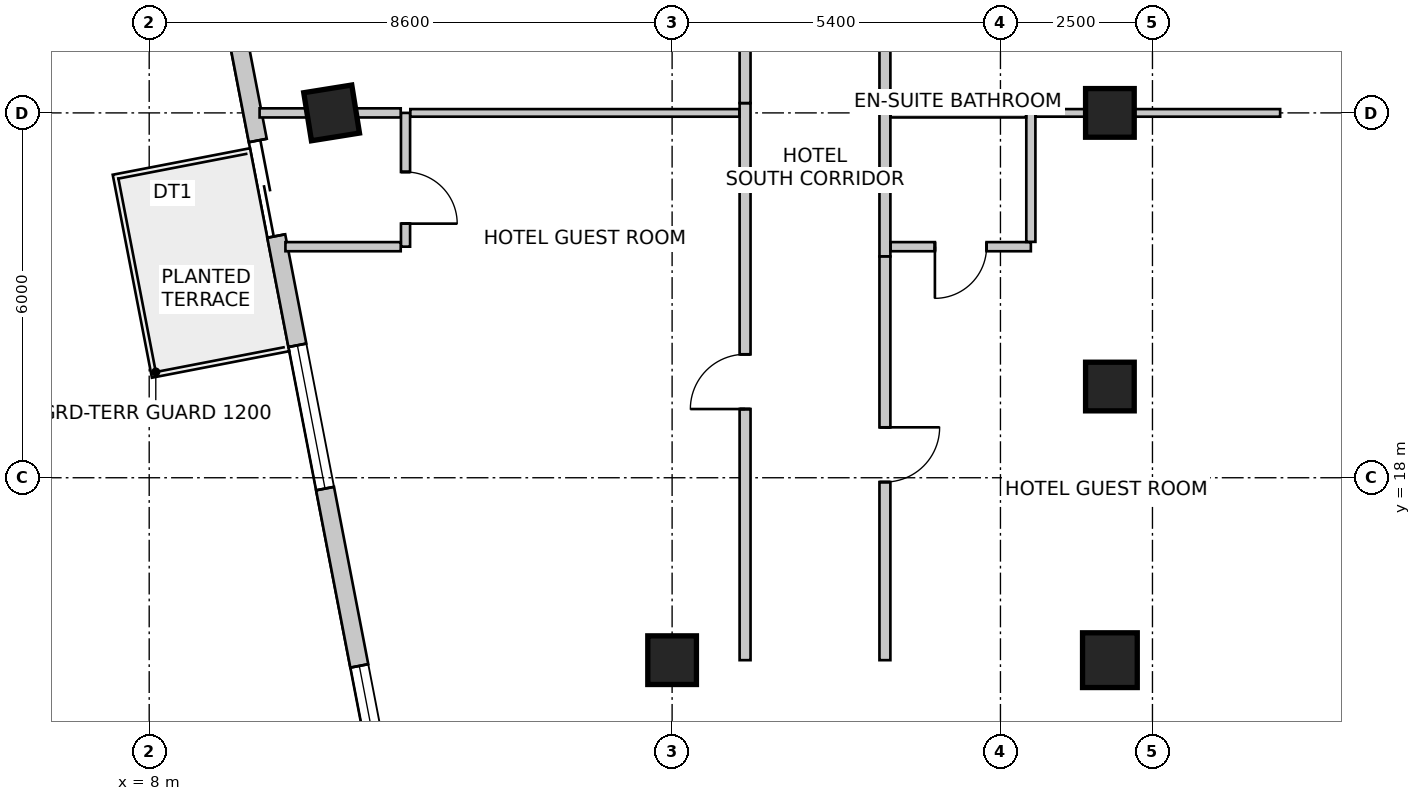
"""IFC4 building model, lengths in metres.
Left out: names, types, materials, properties, quantities, classifications, styles, units other than length and angle.
Written with IfcOpenShell. Run it as: python <this file> out.ifc"""

import sys

from ifc_helpers import new_model, si_unit, direction, frame, frame_2d, origin, origin_2d, place, context, subcontext, project, spatial, rectangle, extrude, source, transform, mapped, element, fill, save


model = new_model("IFC4")
c1 = context("Model", 3, precision=1e-05, world=origin(), true_north=direction((0.0, 1.0)))
c2 = subcontext(c1, "Body", "Model", "MODEL_VIEW")
j1 = project(units=[si_unit("LENGTHUNIT", "METRE"), si_unit("PLANEANGLEUNIT", "RADIAN")], contexts=[c1])
p1 = place(None, origin())
s1 = spatial("IfcSite", under=j1, at=p1, CompositionType="ELEMENT")
p2 = place(p1, origin())
s2 = spatial("IfcBuilding", under=s1, at=p2, CompositionType="ELEMENT")
p3 = place(p2, frame((0.0, 0.0, 114.2)))
s3 = spatial("IfcBuildingStorey", under=s2, at=p3, CompositionType="ELEMENT", Elevation=114.2)
m1 = source(origin(), c2, "Body", "SweptSolid", [
    extrude(rectangle(XDim=0.8, YDim=0.8, at=origin_2d()), origin(), (0.0, 0.0, 1.0), 3.6),
])
for number, where, z_axis, x_axis in (
    (1, (11.0, 24.0, 0.0), (0.0, 0.0, 1.0), (0.158, -0.987, 0.0)),
    (2, (23.8, 24.0, 0.0), (0.0, 0.0, 1.0), (1.0, 0.0, 0.0)),
    (3, (23.8, 19.5, 0.0), (0.0, 0.0, 1.0), (1.0, 0.0, 0.0)),
):
    element("IfcColumn", number, at=place(p3, frame(where, z_axis=z_axis, x_axis=x_axis)), inside=s3, PredefinedType="COLUMN", context=c2, shape_type="MappedRepresentation", body=[
        mapped(m1, transform((0.0, 0.0, 0.0), scale=1.0)),
    ])
m2 = source(origin(), c2, "Body", "SweptSolid", [
    extrude(rectangle(XDim=0.9, YDim=0.9, at=origin_2d()), origin(), (0.0, 0.0, 1.0), 3.6),
])
p4 = place(p3, frame((23.8, 15.0, 0.0), z_axis=(0.0, 0.0, 1.0), x_axis=(1.0, 0.0, 0.0)))
e4 = element("IfcColumn", 4, at=p4, inside=s3, PredefinedType="COLUMN", context=c2, shape_type="MappedRepresentation", body=[
    mapped(m2, transform((0.0, 0.0, 0.0), scale=1.0)),
])
p5 = place(p3, frame((16.6, 15.0, 0.0), z_axis=(0.0, 0.0, 1.0), x_axis=(1.0, 0.0, 0.0)))
e5 = element("IfcColumn", 5, at=p5, inside=s3, PredefinedType="COLUMN", context=c2, shape_type="MappedRepresentation", body=[
    mapped(m1, transform((0.0, 0.0, 0.0), scale=1.0)),
])
p6 = place(p3, frame((8.185, 31.834, 0.0), z_axis=(0.0, 0.0, 1.0), x_axis=(0.189707113148, -0.981840725994, 0.0)))
e6 = element("IfcWall", 6, at=p6, inside=s3, PredefinedType="SOLIDWALL", context=c2, shape_type="SweptSolid", body=[
    extrude(rectangle(XDim=21.221, YDim=0.3, at=frame_2d((10.611, 0.0))), origin(), (0.0, 0.0, 1.0), 3.35),
])
m3 = source(origin(), c2, "Body", "SweptSolid", [
    extrude(rectangle(XDim=1.6, YDim=2.15, at=frame_2d((0.8, 1.075))), frame((0.0, 0.16, 0.0), z_axis=(0.0, -1.0, 0.0), x_axis=(1.0, 0.0, 0.0)), (0.0, 0.0, 1.0), 0.32),
])
p7 = place(p6, frame((8.441, 0.0, 0.0)))
e7 = element("IfcOpeningElement", 7, at=p7, cuts=e6, PredefinedType="OPENING", context=c2, shape_type="MappedRepresentation", body=[
    mapped(m3, transform((0.0, 0.0, 0.0), scale=1.0)),
])
m4 = source(origin(), c2, "Body", "SweptSolid", [
    extrude(rectangle(XDim=1.5, YDim=1.8, at=frame_2d((0.75, 0.9))), frame((0.0, 0.16, 0.0), z_axis=(0.0, -1.0, 0.0), x_axis=(1.0, 0.0, 0.0)), (0.0, 0.0, 1.0), 0.32),
])
p8 = place(p6, frame((0.977, 0.0, 0.85)))
e8 = element("IfcOpeningElement", 8, at=p8, cuts=e6, PredefinedType="OPENING", context=c2, shape_type="MappedRepresentation", body=[
    mapped(m4, transform((0.0, 0.0, 0.0), scale=1.0)),
])
m5 = source(origin(), c2, "Body", "SweptSolid", [
    extrude(rectangle(XDim=2.4, YDim=2.2, at=frame_2d((1.2, 1.1))), frame((0.0, 0.16, 0.0), z_axis=(0.0, -1.0, 0.0), x_axis=(1.0, 0.0, 0.0)), (0.0, 0.0, 1.0), 0.32),
])
p9 = place(p6, frame((4.219, 0.0, 0.85)))
e9 = element("IfcOpeningElement", 9, at=p9, cuts=e6, PredefinedType="OPENING", context=c2, shape_type="MappedRepresentation", body=[
    mapped(m5, transform((0.0, 0.0, 0.0), scale=1.0)),
])
p10 = place(p6, frame((11.871, 0.0, 0.85)))
e10 = element("IfcOpeningElement", 10, at=p10, cuts=e6, PredefinedType="OPENING", context=c2, shape_type="MappedRepresentation", body=[
    mapped(m5, transform((0.0, 0.0, 0.0), scale=1.0)),
])
m6 = source(origin(), c2, "Body", "SweptSolid", [
    extrude(rectangle(XDim=2.1, YDim=2.0, at=frame_2d((1.05, 1.0))), frame((0.0, 0.16, 0.0), z_axis=(0.0, -1.0, 0.0), x_axis=(1.0, 0.0, 0.0)), (0.0, 0.0, 1.0), 0.32),
])
p11 = place(p6, frame((17.241, 0.0, 0.85)))
e11 = element("IfcOpeningElement", 11, at=p11, cuts=e6, PredefinedType="OPENING", context=c2, shape_type="MappedRepresentation", body=[
    mapped(m6, transform((0.0, 0.0, 0.0), scale=1.0)),
])
p12 = place(p3, frame((17.8, 15.0, 0.0), z_axis=(0.0, 0.0, 1.0), x_axis=(0.0, 1.0, 0.0)))
e12 = element("IfcWall", 12, at=p12, inside=s3, PredefinedType="PARTITIONING", context=c2, shape_type="SweptSolid", body=[
    extrude(rectangle(XDim=9.16, YDim=0.18, at=frame_2d((4.58, 0.0))), origin(), (0.0, 0.0, 1.0), 2.492),
])
m7 = source(origin(), c2, "Body", "SweptSolid", [
    extrude(rectangle(XDim=0.9, YDim=2.15, at=frame_2d((0.45, 1.075))), frame((0.0, 0.1, 0.0), z_axis=(0.0, -1.0, 0.0), x_axis=(1.0, 0.0, 0.0)), (0.0, 0.0, 1.0), 0.2),
])
p13 = place(p12, frame((4.13, 0.0, 0.0)))
e13 = element("IfcOpeningElement", 13, at=p13, cuts=e12, PredefinedType="OPENING", context=c2, shape_type="MappedRepresentation", body=[
    mapped(m7, transform((0.0, 0.0, 0.0), scale=1.0)),
])
p14 = place(p3, frame((20.1, 24.16, 0.0), z_axis=(0.0, 0.0, 1.0), x_axis=(0.0, -1.0, 0.0)))
e14 = element("IfcWall", 14, at=p14, inside=s3, PredefinedType="PARTITIONING", context=c2, shape_type="SweptSolid", body=[
    extrude(rectangle(XDim=2.52, YDim=0.18, at=frame_2d((1.26, 0.0))), origin(), (0.0, 0.0, 1.0), 2.803),
])
p15 = place(p3, frame((20.1, 21.638, 0.0), z_axis=(0.0, 0.0, 1.0), x_axis=(0.0, -1.0, 0.0)))
e15 = element("IfcWall", 15, at=p15, inside=s3, PredefinedType="PARTITIONING", context=c2, shape_type="SweptSolid", body=[
    extrude(rectangle(XDim=6.638, YDim=0.18, at=frame_2d((3.319, 0.0))), origin(), (0.0, 0.0, 1.0), 2.492),
])
p16 = place(p15, frame((2.809, 0.0, 0.0)))
e16 = element("IfcOpeningElement", 16, at=p16, cuts=e15, PredefinedType="OPENING", context=c2, shape_type="MappedRepresentation", body=[
    mapped(m7, transform((0.0, 0.0, 0.0), scale=1.0)),
])
p17 = place(p3, frame((17.8, 24.162, 0.0), z_axis=(0.0, 0.0, 1.0), x_axis=(0.0, 1.0, 0.0)))
e17 = element("IfcWall", 17, at=p17, inside=s3, PredefinedType="PARTITIONING", context=c2, shape_type="SweptSolid", body=[
    extrude(rectangle(XDim=6.994, YDim=0.18, at=frame_2d((3.497, 0.0))), origin(), (0.0, 0.0, 1.0), 2.788),
])
p18 = place(p17, frame((3.047, 0.0, 0.0)))
e18 = element("IfcOpeningElement", 18, at=p18, cuts=e17, PredefinedType="OPENING", context=c2, shape_type="MappedRepresentation", body=[
    mapped(m7, transform((0.0, 0.0, 0.0), scale=1.0)),
])
p19 = place(p3, frame((20.1, 28.888, 0.0), z_axis=(0.0, 0.0, 1.0), x_axis=(0.0, -1.0, 0.0)))
e19 = element("IfcWall", 19, at=p19, inside=s3, PredefinedType="PARTITIONING", context=c2, shape_type="SweptSolid", body=[
    extrude(rectangle(XDim=4.726, YDim=0.18, at=frame_2d((2.363, 0.0))), origin(), (0.0, 0.0, 1.0), 2.788),
])
p20 = place(p19, frame((1.853, 0.0, 0.0)))
e20 = element("IfcOpeningElement", 20, at=p20, cuts=e19, PredefinedType="OPENING", context=c2, shape_type="MappedRepresentation", body=[
    mapped(m7, transform((0.0, 0.0, 0.0), scale=1.0)),
])
p21 = place(p3, frame((12.216, 24.0, 0.0), z_axis=(0.0, 0.0, 1.0), x_axis=(0.0, -1.0, 0.0)))
e21 = element("IfcWall", 21, at=p21, inside=s3, PredefinedType="PARTITIONING", context=c2, shape_type="SweptSolid", body=[
    extrude(rectangle(XDim=2.2, YDim=0.15, at=frame_2d((1.1, 0.0))), origin(), (0.0, 0.0, 1.0), 2.788),
])
m8 = source(origin(), c2, "Body", "SweptSolid", [
    extrude(rectangle(XDim=0.85, YDim=2.15, at=frame_2d((0.425, 1.075))), frame((0.0, 0.085, 0.0), z_axis=(0.0, -1.0, 0.0), x_axis=(1.0, 0.0, 0.0)), (0.0, 0.0, 1.0), 0.17),
])
p22 = place(p21, frame((0.971, 0.0, 0.0)))
e22 = element("IfcOpeningElement", 22, at=p22, cuts=e21, PredefinedType="OPENING", context=c2, shape_type="MappedRepresentation", body=[
    mapped(m8, transform((0.0, 0.0, 0.0), scale=1.0)),
])
p23 = place(p3, frame((12.137, 21.8, 0.0), z_axis=(0.0, 0.0, 1.0), x_axis=(-1.0, 0.0, 0.0)))
e23 = element("IfcWall", 23, at=p23, inside=s3, PredefinedType="PARTITIONING", context=c2, shape_type="SweptSolid", body=[
    extrude(rectangle(XDim=1.896, YDim=0.15, at=frame_2d((0.948, 0.0))), origin(), (0.0, 0.0, 1.0), 3.35),
])
p24 = place(p3, frame((9.816, 24.0, 0.0), z_axis=(0.0, 0.0, 1.0), x_axis=(1.0, 0.0, 0.0)))
e24 = element("IfcWall", 24, at=p24, inside=s3, PredefinedType="PARTITIONING", context=c2, shape_type="SweptSolid", body=[
    extrude(rectangle(XDim=2.321, YDim=0.15, at=frame_2d((1.161, 0.0))), origin(), (0.0, 0.0, 1.0), 2.492),
])
p25 = place(p3, frame((12.295, 24.0, 0.0), z_axis=(0.0, 0.0, 1.0), x_axis=(1.0, 0.0, 0.0)))
e25 = element("IfcWall", 25, at=p25, inside=s3, PredefinedType="PARTITIONING", context=c2, shape_type="SweptSolid", body=[
    extrude(rectangle(XDim=5.411, YDim=0.125, at=frame_2d((2.706, 0.0))), origin(), (0.0, 0.0, 1.0), 2.803),
])
p26 = place(p3, frame((22.5, 21.8, 0.0), z_axis=(0.0, 0.0, 1.0), x_axis=(-1.0, 0.0, 0.0)))
e26 = element("IfcWall", 26, at=p26, inside=s3, PredefinedType="PARTITIONING", context=c2, shape_type="SweptSolid", body=[
    extrude(rectangle(XDim=2.306, YDim=0.15, at=frame_2d((1.153, 0.0))), origin(), (0.0, 0.0, 1.0), 3.35),
])
p27 = place(p26, frame((0.728, 0.0, 0.0)))
e27 = element("IfcOpeningElement", 27, at=p27, cuts=e26, PredefinedType="OPENING", context=c2, shape_type="MappedRepresentation", body=[
    mapped(m8, transform((0.0, 0.0, 0.0), scale=1.0)),
])
p28 = place(p3, frame((22.5, 24.0, 0.0), z_axis=(0.0, 0.0, 1.0), x_axis=(0.0, -1.0, 0.0)))
e28 = element("IfcWall", 28, at=p28, inside=s3, PredefinedType="PARTITIONING", context=c2, shape_type="SweptSolid", body=[
    extrude(rectangle(XDim=2.121, YDim=0.15, at=frame_2d((1.061, 0.0))), origin(), (0.0, 0.0, 1.0), 2.803),
])
p29 = place(p3, frame((20.194, 24.0, 0.0), z_axis=(0.0, 0.0, 1.0), x_axis=(1.0, 0.0, 0.0)))
e29 = element("IfcWall", 29, at=p29, inside=s3, PredefinedType="PARTITIONING", context=c2, shape_type="SweptSolid", body=[
    extrude(rectangle(XDim=2.227, YDim=0.15, at=frame_2d((1.113, 0.0))), origin(), (0.0, 0.0, 1.0), 2.803),
])
p30 = place(p3, frame((22.579, 24.0, 0.0), z_axis=(0.0, 0.0, 1.0), x_axis=(1.0, 0.0, 0.0)))
e30 = element("IfcWall", 30, at=p30, inside=s3, PredefinedType="PARTITIONING", context=c2, shape_type="SweptSolid", body=[
    extrude(rectangle(XDim=4.021, YDim=0.125, at=frame_2d((2.01, 0.0))), origin(), (0.0, 0.0, 1.0), 2.492),
])
m9 = source(origin(), c2, "Body", "SweptSolid", [
    extrude(rectangle(XDim=1.6, YDim=2.15, at=frame_2d((0.8, 1.075))), frame((0.0, 0.025, 0.0), z_axis=(0.0, -1.0, 0.0), x_axis=(1.0, 0.0, 0.0)), (0.0, 0.0, 1.0), 0.05),
])
p31 = place(p7, origin())
e31 = element("IfcDoor", 31, at=p31, inside=s3, OperationType="DOUBLE_DOOR_SLIDING", PredefinedType="DOOR", context=c2, shape_type="MappedRepresentation", body=[
    mapped(m9, transform((0.0, 0.0, 0.0), scale=1.0)),
])
fill(e7, e31)
m10 = source(origin(), c2, "Body", "SweptSolid", [
    extrude(rectangle(XDim=2.4, YDim=2.2, at=frame_2d((1.2, 1.1))), frame((0.0, -0.015, 0.0), z_axis=(0.0, -1.0, 0.0), x_axis=(1.0, 0.0, 0.0)), (0.0, 0.0, 1.0), 0.06),
])
p32 = place(p10, origin())
e32 = element("IfcWindow", 32, at=p32, inside=s3, PartitioningType="SINGLE_PANEL", PredefinedType="WINDOW", context=c2, shape_type="MappedRepresentation", body=[
    mapped(m10, transform((0.0, 0.0, 0.0), scale=1.0)),
])
fill(e10, e32)
m11 = source(origin(), c2, "Body", "SweptSolid", [
    extrude(rectangle(XDim=2.1, YDim=2.0, at=frame_2d((1.05, 1.0))), frame((0.0, -0.015, 0.0), z_axis=(0.0, -1.0, 0.0), x_axis=(1.0, 0.0, 0.0)), (0.0, 0.0, 1.0), 0.06),
])
p33 = place(p11, origin())
e33 = element("IfcWindow", 33, at=p33, inside=s3, PartitioningType="SINGLE_PANEL", PredefinedType="WINDOW", context=c2, shape_type="MappedRepresentation", body=[
    mapped(m11, transform((0.0, 0.0, 0.0), scale=1.0)),
])
fill(e11, e33)
m12 = source(origin(), c2, "Body", "SweptSolid", [
    extrude(rectangle(XDim=0.85, YDim=2.15, at=frame_2d((0.425, 1.075))), frame((0.0, 0.025, 0.0), z_axis=(0.0, -1.0, 0.0), x_axis=(1.0, 0.0, 0.0)), (0.0, 0.0, 1.0), 0.05),
])
p34 = place(p22, origin())
e34 = element("IfcDoor", 34, at=p34, inside=s3, OperationType="SINGLE_SWING_RIGHT", PredefinedType="DOOR", context=c2, shape_type="MappedRepresentation", body=[
    mapped(m12, transform((0.0, 0.0, 0.0), scale=1.0)),
])
fill(e22, e34)
m13 = source(origin(), c2, "Body", "SweptSolid", [
    extrude(rectangle(XDim=0.9, YDim=2.15, at=frame_2d((0.45, 1.075))), frame((0.0, 0.025, 0.0), z_axis=(0.0, -1.0, 0.0), x_axis=(1.0, 0.0, 0.0)), (0.0, 0.0, 1.0), 0.05),
])
p35 = place(p13, origin())
e35 = element("IfcDoor", 35, at=p35, inside=s3, OperationType="SINGLE_SWING_LEFT", PredefinedType="DOOR", context=c2, shape_type="MappedRepresentation", body=[
    mapped(m13, transform((0.0, 0.0, 0.0), scale=1.0)),
])
fill(e13, e35)
p36 = place(p27, origin())
e36 = element("IfcDoor", 36, at=p36, inside=s3, OperationType="SINGLE_SWING_RIGHT", PredefinedType="DOOR", context=c2, shape_type="MappedRepresentation", body=[
    mapped(m12, transform((0.0, 0.0, 0.0), scale=1.0)),
])
fill(e27, e36)
p37 = place(p16, origin())
e37 = element("IfcDoor", 37, at=p37, inside=s3, OperationType="SINGLE_SWING_LEFT", PredefinedType="DOOR", context=c2, shape_type="MappedRepresentation", body=[
    mapped(m13, transform((0.0, 0.0, 0.0), scale=1.0)),
])
fill(e16, e37)
save(model, sys.argv[1])
